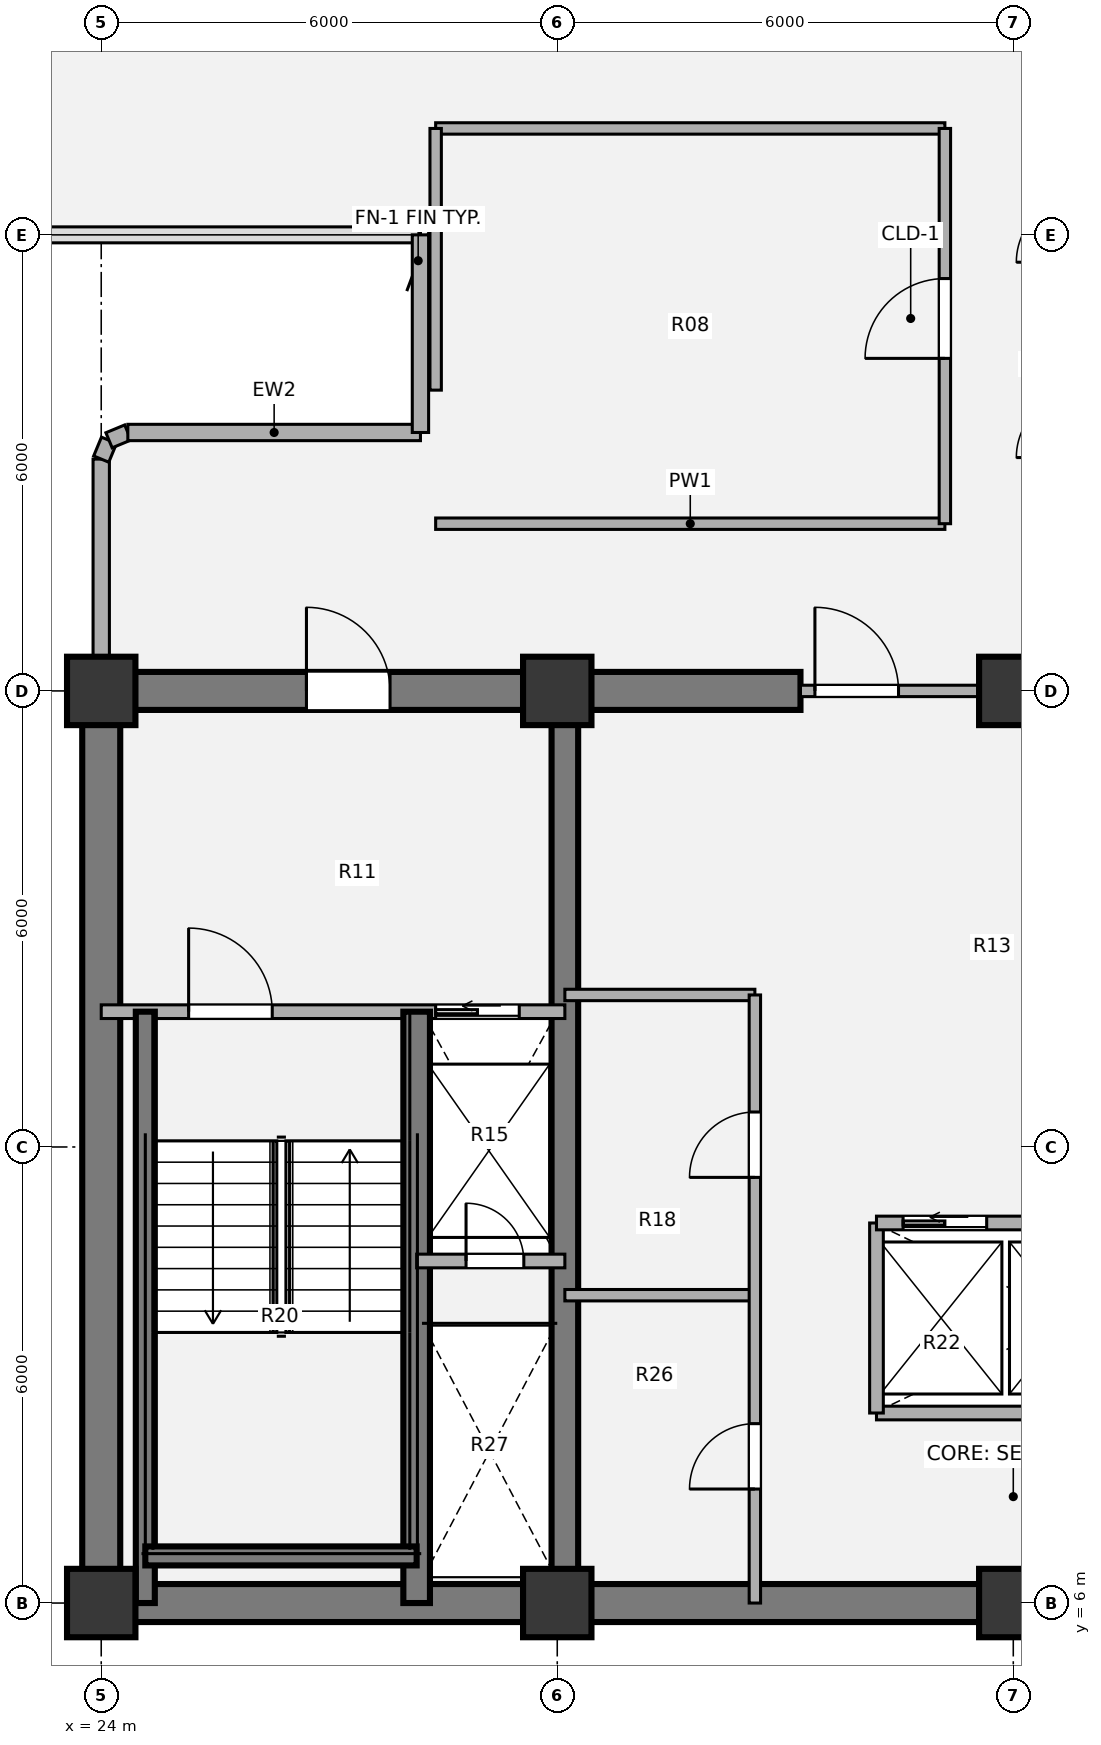
"""IFC4 building model, lengths in metres.
Left out: names, types, materials, properties, quantities, classifications, styles, units other than length and angle.
Written with IfcOpenShell. Run it as: python <this file> out.ifc"""

import sys

from ifc_helpers import new_model, si_unit, direction, frame, frame_2d, origin, origin_2d, place, context, subcontext, project, spatial, rectangle, extrude, source, transform, mapped, element, fill, save


model = new_model("IFC4")
c1 = context("Model", 3, precision=1e-05, world=origin(), true_north=direction((0.0, 1.0)))
c2 = subcontext(c1, "Body", "Model", "MODEL_VIEW")
j1 = project(units=[si_unit("LENGTHUNIT", "METRE"), si_unit("PLANEANGLEUNIT", "RADIAN")], contexts=[c1])
p1 = place(None, origin())
s1 = spatial("IfcSite", under=j1, at=p1, CompositionType="ELEMENT")
p2 = place(p1, origin())
s2 = spatial("IfcBuilding", under=s1, at=p2, CompositionType="ELEMENT")
p3 = place(p2, frame((0.0, 0.0, 108.72)))
s3 = spatial("IfcBuildingStorey", under=s2, at=p3, CompositionType="ELEMENT", Elevation=108.72)
m1 = source(origin(), c2, "Body", "SweptSolid", [
    extrude(rectangle(XDim=0.9, YDim=0.9, at=origin_2d()), origin(), (0.0, 0.0, 1.0), 3.78),
])
for number, where, z_axis, x_axis in (
    (1, (24.0, 6.0, 0.0), (0.0, 0.0, 1.0), (1.0, 0.0, 0.0)),
    (2, (30.0, 6.0, 0.0), (0.0, 0.0, 1.0), (1.0, 0.0, 0.0)),
    (3, (36.0, 6.0, 0.0), (0.0, 0.0, 1.0), (1.0, 0.0, 0.0)),
    (4, (24.0, 18.0, 0.0), (0.0, 0.0, 1.0), (1.0, 0.0, 0.0)),
    (5, (30.0, 18.0, 0.0), (0.0, 0.0, 1.0), (1.0, 0.0, 0.0)),
    (6, (36.0, 18.0, 0.0), (0.0, 0.0, 1.0), (1.0, 0.0, 0.0)),
):
    element("IfcColumn", number, at=place(p3, frame(where, z_axis=z_axis, x_axis=x_axis)), inside=s3, PredefinedType="COLUMN", context=c2, shape_type="MappedRepresentation", body=[
        mapped(m1, transform((0.0, 0.0, 0.0), x_axis=(1.0, 0.0, 0.0), y_axis=(0.0, 1.0, 0.0), z_axis=(0.0, 0.0, 1.0), scale=1.0)),
    ])
p4 = place(p3, frame((48.25, 6.0, 0.0), z_axis=(0.0, 0.0, 1.0), x_axis=(-1.0, 0.0, 0.0)))
e7 = element("IfcWall", 7, at=p4, inside=s3, PredefinedType="SHEAR", context=c2, shape_type="SweptSolid", body=[
    extrude(rectangle(XDim=24.5, YDim=0.5, at=frame_2d((12.25, 0.0))), origin(), (0.0, 0.0, 1.0), 3.78),
])
p5 = place(p3, frame((24.0, 6.0, 0.0), z_axis=(0.0, 0.0, 1.0), x_axis=(0.0, 1.0, 0.0)))
e8 = element("IfcWall", 8, at=p5, inside=s3, PredefinedType="SHEAR", context=c2, shape_type="SweptSolid", body=[
    extrude(rectangle(XDim=12.0, YDim=0.5, at=frame_2d((6.0, 0.0))), origin(), (0.0, 0.0, 1.0), 3.78),
])
p6 = place(p3, frame((23.75, 18.0, 0.0), z_axis=(0.0, 0.0, 1.0), x_axis=(1.0, 0.0, 0.0)))
e9 = element("IfcWall", 9, at=p6, inside=s3, PredefinedType="SHEAR", context=c2, shape_type="SweptSolid", body=[
    extrude(rectangle(XDim=9.45, YDim=0.5, at=frame_2d((4.725, 0.0))), origin(), (0.0, 0.0, 1.0), 3.78),
])
p7 = place(p6, frame((2.95, 0.0, 0.0)))
e10 = element("IfcOpeningElement", 10, at=p7, cuts=e9, PredefinedType="OPENING", context=c2, shape_type="SweptSolid", body=[
    extrude(rectangle(XDim=1.1, YDim=2.1, at=origin_2d()), frame((0.55, 0.26, 1.05), z_axis=(0.0, -1.0, 0.0), x_axis=(1.0, 0.0, 0.0)), (0.0, 0.0, 1.0), 0.52),
])
p8 = place(p3, frame((30.1, 6.0, 0.0), z_axis=(0.0, 0.0, 1.0), x_axis=(0.0, 1.0, 0.0)))
e11 = element("IfcWall", 11, at=p8, inside=s3, PredefinedType="SHEAR", context=c2, shape_type="SweptSolid", body=[
    extrude(rectangle(XDim=12.0, YDim=0.35, at=frame_2d((6.0, 0.0))), origin(), (0.0, 0.0, 1.0), 3.78),
])
p9 = place(p3, frame((24.0, 18.43, 0.0), z_axis=(0.0, 0.0, 1.0), x_axis=(0.0, 1.0, 0.0)))
e12 = element("IfcWall", 12, at=p9, inside=s3, PredefinedType="SOLIDWALL", context=c2, shape_type="SweptSolid", body=[
    extrude(rectangle(XDim=2.62, YDim=0.215, at=frame_2d((1.31, 0.0))), origin(), (0.0, 0.0, 1.0), 3.53),
])
p10 = place(p3, frame((24.0, 21.05, 0.0), z_axis=(0.0, 0.0, 1.0), x_axis=(0.382673670509, 0.923883575944, 0.0)))
e13 = element("IfcWall", 13, at=p10, inside=s3, PredefinedType="SOLIDWALL", context=c2, shape_type="SweptSolid", body=[
    extrude(rectangle(XDim=0.268, YDim=0.215, at=frame_2d((0.134, 0.0))), origin(), (0.0, 0.0, 1.0), 3.53),
])
p11 = place(p3, frame((24.103, 21.298, 0.0), z_axis=(0.0, 0.0, 1.0), x_axis=(0.924205486139, 0.381895560841, 0.0)))
e14 = element("IfcWall", 14, at=p11, inside=s3, PredefinedType="SOLIDWALL", context=c2, shape_type="SweptSolid", body=[
    extrude(rectangle(XDim=0.268, YDim=0.215, at=frame_2d((0.134, 0.0))), origin(), (0.0, 0.0, 1.0), 3.53),
])
p12 = place(p3, frame((24.35, 21.4, 0.0), z_axis=(0.0, 0.0, 1.0), x_axis=(1.0, 0.0, 0.0)))
e15 = element("IfcWall", 15, at=p12, inside=s3, PredefinedType="SOLIDWALL", context=c2, shape_type="SweptSolid", body=[
    extrude(rectangle(XDim=3.85, YDim=0.215, at=frame_2d((1.925, 0.0))), origin(), (0.0, 0.0, 1.0), 3.53),
])
p13 = place(p3, frame((28.2, 21.4, 0.0), z_axis=(0.0, 0.0, 1.0), x_axis=(0.0, 1.0, 0.0)))
e16 = element("IfcWall", 16, at=p13, inside=s3, PredefinedType="SOLIDWALL", context=c2, shape_type="SweptSolid", body=[
    extrude(rectangle(XDim=2.6, YDim=0.215, at=frame_2d((1.3, 0.0))), origin(), (0.0, 0.0, 1.0), 3.53),
])
p14 = place(p3, frame((30.1, 14.0, 0.0), z_axis=(0.0, 0.0, 1.0), x_axis=(1.0, 0.0, 0.0)))
e17 = element("IfcWall", 17, at=p14, inside=s3, PredefinedType="PARTITIONING", context=c2, shape_type="SweptSolid", body=[
    extrude(rectangle(XDim=2.5, YDim=0.15, at=frame_2d((1.25, 0.0))), origin(), (0.0, 0.0, 1.0), 3.5),
])
p15 = place(p3, frame((34.2, 8.5, 0.0), z_axis=(0.0, 0.0, 1.0), x_axis=(1.0, 0.0, 0.0)))
e18 = element("IfcWall", 18, at=p15, inside=s3, PredefinedType="PARTITIONING", context=c2, shape_type="SweptSolid", body=[
    extrude(rectangle(XDim=5.15, YDim=0.18, at=frame_2d((2.575, 0.0))), origin(), (0.0, 0.0, 1.0), 3.5),
])
p16 = place(p3, frame((34.2, 8.5, 0.0), z_axis=(0.0, 0.0, 1.0), x_axis=(0.0, 1.0, 0.0)))
e19 = element("IfcWall", 19, at=p16, inside=s3, PredefinedType="PARTITIONING", context=c2, shape_type="SweptSolid", body=[
    extrude(rectangle(XDim=2.5, YDim=0.18, at=frame_2d((1.25, 0.0))), origin(), (0.0, 0.0, 1.0), 3.5),
])
p17 = place(p3, frame((30.1, 10.05, 0.0), z_axis=(0.0, 0.0, 1.0), x_axis=(1.0, 0.0, 0.0)))
e20 = element("IfcWall", 20, at=p17, inside=s3, PredefinedType="PARTITIONING", context=c2, shape_type="SweptSolid", body=[
    extrude(rectangle(XDim=2.5, YDim=0.15, at=frame_2d((1.25, 0.0))), origin(), (0.0, 0.0, 1.0), 3.5),
])
p18 = place(p3, frame((32.6, 6.0, 0.0), z_axis=(0.0, 0.0, 1.0), x_axis=(0.0, 1.0, 0.0)))
e21 = element("IfcWall", 21, at=p18, inside=s3, PredefinedType="PARTITIONING", context=c2, shape_type="SweptSolid", body=[
    extrude(rectangle(XDim=8.0, YDim=0.15, at=frame_2d((4.0, 0.0))), origin(), (0.0, 0.0, 1.0), 3.5),
])
p19 = place(p18, frame((1.5, 0.0, 0.0)))
e22 = element("IfcOpeningElement", 22, at=p19, cuts=e21, PredefinedType="OPENING", context=c2, shape_type="SweptSolid", body=[
    extrude(rectangle(XDim=0.86, YDim=2.1, at=origin_2d()), frame((0.43, 0.085, 1.05), z_axis=(0.0, -1.0, 0.0), x_axis=(1.0, 0.0, 0.0)), (0.0, 0.0, 1.0), 0.17),
])
p20 = place(p18, frame((5.6, 0.0, 0.0)))
e23 = element("IfcOpeningElement", 23, at=p20, cuts=e21, PredefinedType="OPENING", context=c2, shape_type="SweptSolid", body=[
    extrude(rectangle(XDim=0.86, YDim=2.1, at=origin_2d()), frame((0.43, 0.085, 1.05), z_axis=(0.0, -1.0, 0.0), x_axis=(1.0, 0.0, 0.0)), (0.0, 0.0, 1.0), 0.17),
])
p21 = place(p3, frame((33.2, 18.0, 0.0), z_axis=(0.0, 0.0, 1.0), x_axis=(1.0, 0.0, 0.0)))
e24 = element("IfcWall", 24, at=p21, inside=s3, PredefinedType="PARTITIONING", context=c2, shape_type="SweptSolid", body=[
    extrude(rectangle(XDim=5.6, YDim=0.15, at=frame_2d((2.8, 0.0))), origin(), (0.0, 0.0, 1.0), 2.315),
])
p22 = place(p21, frame((0.19, 0.0, 0.0)))
e25 = element("IfcOpeningElement", 25, at=p22, cuts=e24, PredefinedType="OPENING", context=c2, shape_type="SweptSolid", body=[
    extrude(rectangle(XDim=1.1, YDim=2.1, at=origin_2d()), frame((0.55, 0.085, 1.05), z_axis=(0.0, -1.0, 0.0), x_axis=(1.0, 0.0, 0.0)), (0.0, 0.0, 1.0), 0.17),
])
p23 = place(p21, frame((4.31, 0.0, 0.0)))
e26 = element("IfcOpeningElement", 26, at=p23, cuts=e24, PredefinedType="OPENING", context=c2, shape_type="SweptSolid", body=[
    extrude(rectangle(XDim=1.1, YDim=2.1, at=origin_2d()), frame((0.55, 0.085, 1.05), z_axis=(0.0, -1.0, 0.0), x_axis=(1.0, 0.0, 0.0)), (0.0, 0.0, 1.0), 0.17),
])
p24 = place(p3, frame((24.0, 13.78, 0.0), z_axis=(0.0, 0.0, 1.0), x_axis=(1.0, 0.0, 0.0)))
e27 = element("IfcWall", 27, at=p24, inside=s3, PredefinedType="PARTITIONING", context=c2, shape_type="SweptSolid", body=[
    extrude(rectangle(XDim=6.1, YDim=0.18, at=frame_2d((3.05, 0.0))), origin(), (0.0, 0.0, 1.0), 3.5),
])
p25 = place(p24, frame((1.15, 0.0, 0.0)))
e28 = element("IfcOpeningElement", 28, at=p25, cuts=e27, PredefinedType="OPENING", context=c2, shape_type="SweptSolid", body=[
    extrude(rectangle(XDim=1.1, YDim=2.1, at=origin_2d()), frame((0.55, 0.1, 1.05), z_axis=(0.0, -1.0, 0.0), x_axis=(1.0, 0.0, 0.0)), (0.0, 0.0, 1.0), 0.2),
])
p26 = place(p24, frame((4.4, 0.0, 0.0)))
e29 = element("IfcOpeningElement", 29, at=p26, cuts=e27, PredefinedType="OPENING", context=c2, shape_type="SweptSolid", body=[
    extrude(rectangle(XDim=1.1, YDim=2.1, at=origin_2d()), frame((0.55, 0.1, 1.05), z_axis=(0.0, -1.0, 0.0), x_axis=(1.0, 0.0, 0.0)), (0.0, 0.0, 1.0), 0.2),
])
p27 = place(p3, frame((28.15, 6.0, 0.0), z_axis=(0.0, 0.0, 1.0), x_axis=(0.0, 1.0, 0.0)))
e30 = element("IfcWall", 30, at=p27, inside=s3, PredefinedType="SHEAR", context=c2, shape_type="SweptSolid", body=[
    extrude(rectangle(XDim=7.78, YDim=0.35, at=frame_2d((3.89, 0.0))), origin(), (0.0, 0.0, 1.0), 3.85),
])
p28 = place(p3, frame((24.58, 6.0, 0.0), z_axis=(0.0, 0.0, 1.0), x_axis=(0.0, 1.0, 0.0)))
e31 = element("IfcWall", 31, at=p28, inside=s3, PredefinedType="SHEAR", context=c2, shape_type="SweptSolid", body=[
    extrude(rectangle(XDim=7.78, YDim=0.25, at=frame_2d((3.89, 0.0))), origin(), (0.0, 0.0, 1.0), 3.85),
])
p29 = place(p3, frame((24.58, 6.62, 0.0), z_axis=(0.0, 0.0, 1.0), x_axis=(1.0, 0.0, 0.0)))
e32 = element("IfcWall", 32, at=p29, inside=s3, PredefinedType="SHEAR", context=c2, shape_type="SweptSolid", body=[
    extrude(rectangle(XDim=3.57, YDim=0.25, at=frame_2d((1.785, 0.0))), origin(), (0.0, 0.0, 1.0), 3.85),
])
p30 = place(p3, frame((28.15, 10.5, 0.0), z_axis=(0.0, 0.0, 1.0), x_axis=(1.0, 0.0, 0.0)))
e33 = element("IfcWall", 33, at=p30, inside=s3, PredefinedType="PARTITIONING", context=c2, shape_type="SweptSolid", body=[
    extrude(rectangle(XDim=1.95, YDim=0.18, at=frame_2d((0.975, 0.0))), origin(), (0.0, 0.0, 1.0), 3.5),
])
p31 = place(p30, frame((0.65, 0.0, 0.0)))
e34 = element("IfcOpeningElement", 34, at=p31, cuts=e33, PredefinedType="OPENING", context=c2, shape_type="SweptSolid", body=[
    extrude(rectangle(XDim=0.76, YDim=2.05, at=origin_2d()), frame((0.38, 0.1, 1.025), z_axis=(0.0, -1.0, 0.0), x_axis=(1.0, 0.0, 0.0)), (0.0, 0.0, 1.0), 0.2),
])
p32 = place(p3, frame((34.2, 11.0, 0.0), z_axis=(0.0, 0.0, 1.0), x_axis=(1.0, 0.0, 0.0)))
e35 = element("IfcWall", 35, at=p32, inside=s3, PredefinedType="PARTITIONING", context=c2, shape_type="SweptSolid", body=[
    extrude(rectangle(XDim=5.15, YDim=0.18, at=frame_2d((2.575, 0.0))), origin(), (0.0, 0.0, 1.0), 3.5),
])
p33 = place(p32, frame((0.35, 0.0, 0.0)))
e36 = element("IfcOpeningElement", 36, at=p33, cuts=e35, PredefinedType="OPENING", context=c2, shape_type="SweptSolid", body=[
    extrude(rectangle(XDim=1.1, YDim=2.1, at=origin_2d()), frame((0.55, 0.1, 1.05), z_axis=(0.0, -1.0, 0.0), x_axis=(1.0, 0.0, 0.0)), (0.0, 0.0, 1.0), 0.2),
])
p34 = place(p32, frame((2.05, 0.0, 0.0)))
e37 = element("IfcOpeningElement", 37, at=p34, cuts=e35, PredefinedType="OPENING", context=c2, shape_type="SweptSolid", body=[
    extrude(rectangle(XDim=1.1, YDim=2.1, at=origin_2d()), frame((0.55, 0.1, 1.05), z_axis=(0.0, -1.0, 0.0), x_axis=(1.0, 0.0, 0.0)), (0.0, 0.0, 1.0), 0.2),
])
p35 = place(p32, frame((3.7, 0.0, 0.0)))
e38 = element("IfcOpeningElement", 38, at=p35, cuts=e35, PredefinedType="OPENING", context=c2, shape_type="SweptSolid", body=[
    extrude(rectangle(XDim=1.1, YDim=2.1, at=origin_2d()), frame((0.55, 0.1, 1.05), z_axis=(0.0, -1.0, 0.0), x_axis=(1.0, 0.0, 0.0)), (0.0, 0.0, 1.0), 0.2),
])
for number, where, z_axis, x_axis in (
    (39, (28.4, 20.2, 0.0), (0.0, 0.0, 1.0), (1.0, 0.0, 0.0)),
    (40, (28.4, 25.4, 0.0), (0.0, 0.0, 1.0), (1.0, 0.0, 0.0)),
):
    element("IfcWall", number, at=place(p3, frame(where, z_axis=z_axis, x_axis=x_axis)), inside=s3, PredefinedType="PARTITIONING", context=c2, shape_type="SweptSolid", body=[
        extrude(rectangle(XDim=6.7, YDim=0.15, at=frame_2d((3.35, 0.0))), origin(), (0.0, 0.0, 1.0), 3.5),
    ])
p36 = place(p3, frame((28.4, 21.957, 0.0), z_axis=(0.0, 0.0, 1.0), x_axis=(0.0, 1.0, 0.0)))
e41 = element("IfcWall", 41, at=p36, inside=s3, PredefinedType="PARTITIONING", context=c2, shape_type="SweptSolid", body=[
    extrude(rectangle(XDim=3.443, YDim=0.15, at=frame_2d((1.721, 0.0))), origin(), (0.0, 0.0, 1.0), 3.5),
])
p37 = place(p3, frame((35.1, 20.2, 0.0), z_axis=(0.0, 0.0, 1.0), x_axis=(0.0, 1.0, 0.0)))
e42 = element("IfcWall", 42, at=p37, inside=s3, PredefinedType="PARTITIONING", context=c2, shape_type="SweptSolid", body=[
    extrude(rectangle(XDim=5.2, YDim=0.15, at=frame_2d((2.6, 0.0))), origin(), (0.0, 0.0, 1.0), 3.5),
])
p38 = place(p37, frame((2.175, 0.0, 0.0)))
e43 = element("IfcOpeningElement", 43, at=p38, cuts=e42, PredefinedType="OPENING", context=c2, shape_type="SweptSolid", body=[
    extrude(rectangle(XDim=1.05, YDim=2.1, at=origin_2d()), frame((0.525, 0.085, 1.05), z_axis=(0.0, -1.0, 0.0), x_axis=(1.0, 0.0, 0.0)), (0.0, 0.0, 1.0), 0.17),
])
m2 = source(origin(), c2, "Body", "SweptSolid", [
    extrude(rectangle(XDim=0.86, YDim=2.1, at=origin_2d()), frame((0.43, 0.025, 1.05), z_axis=(0.0, -1.0, 0.0), x_axis=(1.0, 0.0, 0.0)), (0.0, 0.0, 1.0), 0.05),
])
p39 = place(p19, origin())
e44 = element("IfcDoor", 44, at=p39, inside=s3, OperationType="SINGLE_SWING_LEFT", PredefinedType="DOOR", context=c2, shape_type="MappedRepresentation", body=[
    mapped(m2, transform((0.0, 0.0, 0.0), x_axis=(1.0, 0.0, 0.0), y_axis=(0.0, 1.0, 0.0), z_axis=(0.0, 0.0, 1.0), scale=1.0)),
])
fill(e22, e44)
p40 = place(p20, origin())
e45 = element("IfcDoor", 45, at=p40, inside=s3, OperationType="SINGLE_SWING_LEFT", PredefinedType="DOOR", context=c2, shape_type="MappedRepresentation", body=[
    mapped(m2, transform((0.0, 0.0, 0.0), x_axis=(1.0, 0.0, 0.0), y_axis=(0.0, 1.0, 0.0), z_axis=(0.0, 0.0, 1.0), scale=1.0)),
])
fill(e23, e45)
m3 = source(origin(), c2, "Body", "SweptSolid", [
    extrude(rectangle(XDim=1.1, YDim=2.1, at=origin_2d()), frame((0.55, 0.025, 1.05), z_axis=(0.0, -1.0, 0.0), x_axis=(1.0, 0.0, 0.0)), (0.0, 0.0, 1.0), 0.05),
])
p41 = place(p22, origin())
e46 = element("IfcDoor", 46, at=p41, inside=s3, OperationType="SINGLE_SWING_LEFT", PredefinedType="DOOR", context=c2, shape_type="MappedRepresentation", body=[
    mapped(m3, transform((0.0, 0.0, 0.0), x_axis=(1.0, 0.0, 0.0), y_axis=(0.0, 1.0, 0.0), z_axis=(0.0, 0.0, 1.0), scale=1.0)),
])
fill(e25, e46)
m4 = source(origin(), c2, "Body", "SweptSolid", [
    extrude(rectangle(XDim=1.1, YDim=2.1, at=origin_2d()), frame((0.55, 0.025, 1.05), z_axis=(0.0, -1.0, 0.0), x_axis=(1.0, 0.0, 0.0)), (0.0, 0.0, 1.0), 0.05),
])
p42 = place(p25, origin())
e47 = element("IfcDoor", 47, at=p42, inside=s3, OperationType="SINGLE_SWING_LEFT", PredefinedType="DOOR", context=c2, shape_type="MappedRepresentation", body=[
    mapped(m4, transform((0.0, 0.0, 0.0), x_axis=(1.0, 0.0, 0.0), y_axis=(0.0, 1.0, 0.0), z_axis=(0.0, 0.0, 1.0), scale=1.0)),
])
fill(e28, e47)
m5 = source(origin(), c2, "Body", "SweptSolid", [
    extrude(rectangle(XDim=1.1, YDim=2.1, at=origin_2d()), frame((0.55, 0.025, 1.05), z_axis=(0.0, -1.0, 0.0), x_axis=(1.0, 0.0, 0.0)), (0.0, 0.0, 1.0), 0.05),
])
p43 = place(p26, origin())
e48 = element("IfcDoor", 48, at=p43, inside=s3, OperationType="SLIDING_TO_LEFT", PredefinedType="DOOR", context=c2, shape_type="MappedRepresentation", body=[
    mapped(m5, transform((0.0, 0.0, 0.0), x_axis=(1.0, 0.0, 0.0), y_axis=(0.0, 1.0, 0.0), z_axis=(0.0, 0.0, 1.0), scale=1.0)),
])
fill(e29, e48)
m6 = source(origin(), c2, "Body", "SweptSolid", [
    extrude(rectangle(XDim=0.76, YDim=2.05, at=origin_2d()), frame((0.38, 0.025, 1.025), z_axis=(0.0, -1.0, 0.0), x_axis=(1.0, 0.0, 0.0)), (0.0, 0.0, 1.0), 0.05),
])
p44 = place(p31, origin())
e49 = element("IfcDoor", 49, at=p44, inside=s3, OperationType="SINGLE_SWING_LEFT", PredefinedType="DOOR", context=c2, shape_type="MappedRepresentation", body=[
    mapped(m6, transform((0.0, 0.0, 0.0), x_axis=(1.0, 0.0, 0.0), y_axis=(0.0, 1.0, 0.0), z_axis=(0.0, 0.0, 1.0), scale=1.0)),
])
fill(e34, e49)
p45 = place(p7, origin())
e50 = element("IfcDoor", 50, at=p45, inside=s3, OperationType="SINGLE_SWING_LEFT", PredefinedType="DOOR", context=c2, shape_type="MappedRepresentation", body=[
    mapped(m3, transform((0.0, 0.0, 0.0), x_axis=(1.0, 0.0, 0.0), y_axis=(0.0, 1.0, 0.0), z_axis=(0.0, 0.0, 1.0), scale=1.0)),
])
fill(e10, e50)
p46 = place(p33, origin())
e51 = element("IfcDoor", 51, at=p46, inside=s3, OperationType="SLIDING_TO_LEFT", PredefinedType="DOOR", context=c2, shape_type="MappedRepresentation", body=[
    mapped(m5, transform((0.0, 0.0, 0.0), x_axis=(1.0, 0.0, 0.0), y_axis=(0.0, 1.0, 0.0), z_axis=(0.0, 0.0, 1.0), scale=1.0)),
])
fill(e36, e51)
m7 = source(origin(), c2, "Body", "SweptSolid", [
    extrude(rectangle(XDim=1.05, YDim=2.1, at=origin_2d()), frame((0.525, 0.025, 1.05), z_axis=(0.0, -1.0, 0.0), x_axis=(1.0, 0.0, 0.0)), (0.0, 0.0, 1.0), 0.05),
])
p47 = place(p38, origin())
e52 = element("IfcDoor", 52, at=p47, inside=s3, OperationType="SINGLE_SWING_LEFT", PredefinedType="DOOR", context=c2, shape_type="MappedRepresentation", body=[
    mapped(m7, transform((0.0, 0.0, 0.0), x_axis=(1.0, 0.0, 0.0), y_axis=(0.0, 1.0, 0.0), z_axis=(0.0, 0.0, 1.0), scale=1.0)),
])
fill(e43, e52)
save(model, sys.argv[1])
